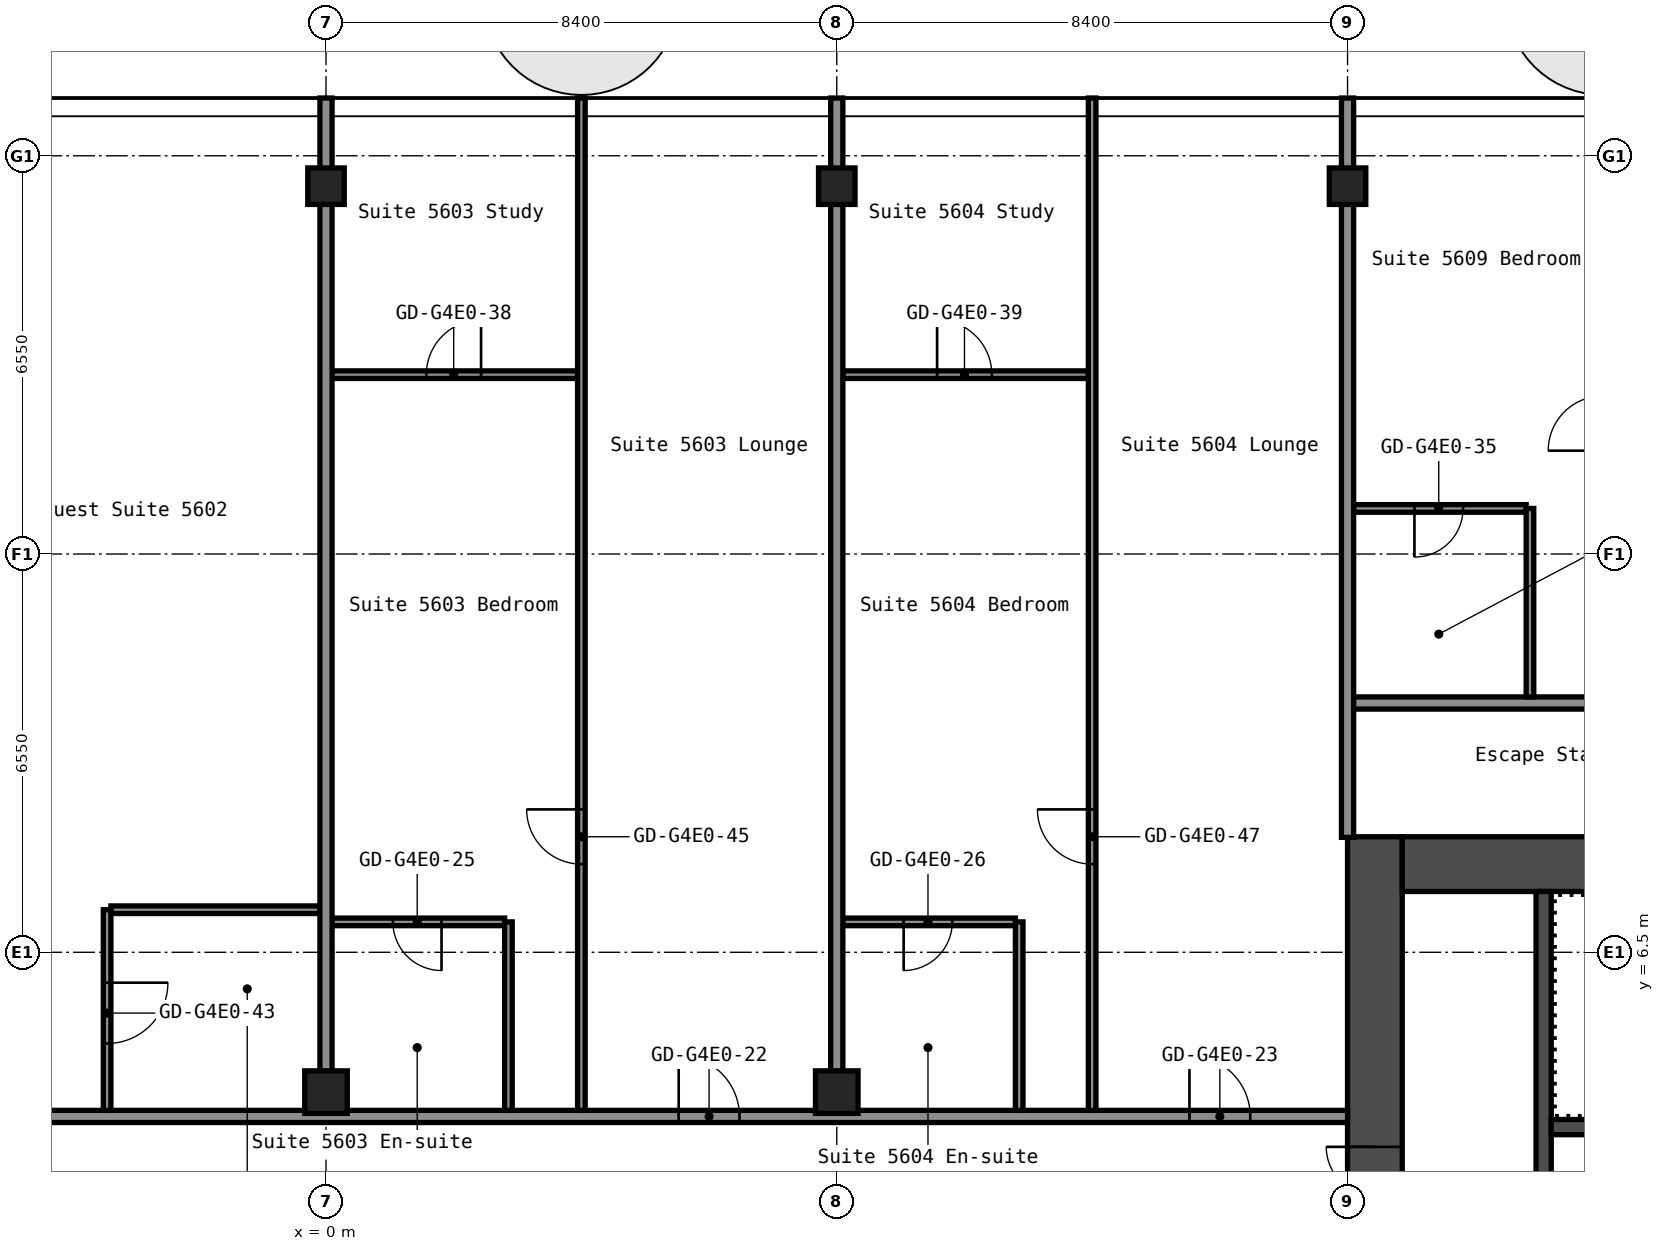
"""IFC4 building model, lengths in metres.
Left out: names, types, materials, properties, quantities, classifications, styles, units other than length and angle.
Written with IfcOpenShell. Run it as: python <this file> out.ifc"""

import sys

from ifc_helpers import new_model, si_unit, direction, frame, frame_2d, origin, origin_2d, place, context, subcontext, project, spatial, rectangle, hollow_rectangle, extrude, element, fill, save


model = new_model("IFC4")
c1 = context("Model", 3, precision=1e-05, world=origin(), true_north=direction((0.0, 1.0)))
c2 = subcontext(c1, "Body", "Model", "MODEL_VIEW")
j1 = project(units=[si_unit("LENGTHUNIT", "METRE"), si_unit("PLANEANGLEUNIT", "RADIAN")], contexts=[c1])
p1 = place(None, origin())
s1 = spatial("IfcSite", under=j1, at=p1, CompositionType="ELEMENT")
p2 = place(p1, origin())
s2 = spatial("IfcBuilding", under=s1, at=p2, CompositionType="ELEMENT")
p3 = place(p2, frame((0.0, 0.0, 199.4)))
s3 = spatial("IfcBuildingStorey", under=s2, at=p3, CompositionType="ELEMENT", Elevation=199.4)
p4 = place(p3, frame((0.0, 4.2, 0.0), z_axis=(0.0, 0.0, 1.0), x_axis=(1.0, 0.0, 0.0)))
e1 = element("IfcColumn", 1, at=p4, inside=s3, PredefinedType="COLUMN", context=c2, shape_type="SweptSolid", body=[
    extrude(hollow_rectangle(XDim=0.7, YDim=0.7, WallThickness=0.028, at=origin_2d()), origin(), (0.0, 0.0, 1.0), 2.75),
])
p5 = place(p3, frame((0.0, 19.1, 0.0), z_axis=(0.0, 0.0, 1.0), x_axis=(1.0, 0.0, 0.0)))
e2 = element("IfcColumn", 2, at=p5, inside=s3, PredefinedType="COLUMN", context=c2, shape_type="SweptSolid", body=[
    extrude(hollow_rectangle(XDim=0.6, YDim=0.6, WallThickness=0.025, InnerFilletRadius=0.038, OuterFilletRadius=0.062, at=origin_2d()), origin(), (0.0, 0.0, 1.0), 2.75),
])
p6 = place(p3, frame((8.4, 4.2, 0.0), z_axis=(0.0, 0.0, 1.0), x_axis=(1.0, 0.0, 0.0)))
e3 = element("IfcColumn", 3, at=p6, inside=s3, PredefinedType="COLUMN", context=c2, shape_type="SweptSolid", body=[
    extrude(hollow_rectangle(XDim=0.7, YDim=0.7, WallThickness=0.028, at=origin_2d()), origin(), (0.0, 0.0, 1.0), 2.75),
])
for number, where, z_axis, x_axis in (
    (4, (8.4, 19.1, 0.0), (0.0, 0.0, 1.0), (1.0, 0.0, 0.0)),
    (5, (16.8, 19.1, 0.0), (0.0, 0.0, 1.0), (1.0, 0.0, 0.0)),
):
    element("IfcColumn", number, at=place(p3, frame(where, z_axis=z_axis, x_axis=x_axis)), inside=s3, PredefinedType="COLUMN", context=c2, shape_type="SweptSolid", body=[
        extrude(hollow_rectangle(XDim=0.6, YDim=0.6, WallThickness=0.025, InnerFilletRadius=0.038, OuterFilletRadius=0.062, at=origin_2d()), origin(), (0.0, 0.0, 1.0), 2.75),
    ])
p7 = place(p3, frame((17.25, -8.4, 0.0), z_axis=(0.0, 0.0, 1.0), x_axis=(0.0, 1.0, 0.0)))
e6 = element("IfcWall", 6, at=p7, inside=s3, PredefinedType="SHEAR", context=c2, shape_type="SweptSolid", body=[
    extrude(rectangle(XDim=16.8, YDim=0.9, at=frame_2d((8.4, 0.0))), origin(), (0.0, 0.0, 1.0), 2.75),
])
p8 = place(p7, frame((10.1, 0.0, 0.0)))
e7 = element("IfcOpeningElement", 7, at=p8, cuts=e6, PredefinedType="OPENING", context=c2, shape_type="SweptSolid", body=[
    extrude(rectangle(XDim=1.6, YDim=2.1, at=frame_2d((0.8, 1.05))), frame((0.0, 0.46, 0.0), z_axis=(0.0, -1.0, 0.0), x_axis=(1.0, 0.0, 0.0)), (0.0, 0.0, 1.0), 0.92),
])
p9 = place(p3, frame((17.7, 7.95, 0.0), z_axis=(0.0, 0.0, 1.0), x_axis=(1.0, 0.0, 0.0)))
e8 = element("IfcWall", 8, at=p9, inside=s3, PredefinedType="SHEAR", context=c2, shape_type="SweptSolid", body=[
    extrude(rectangle(XDim=15.0, YDim=0.9, at=frame_2d((7.5, 0.0))), origin(), (0.0, 0.0, 1.0), 2.75),
])
p10 = place(p9, frame((10.4, 0.0, 0.0)))
e9 = element("IfcOpeningElement", 9, at=p10, cuts=e8, PredefinedType="OPENING", context=c2, shape_type="SweptSolid", body=[
    extrude(rectangle(XDim=1.2, YDim=2.1, at=frame_2d((0.6, 1.05))), frame((0.0, 0.46, 0.0), z_axis=(0.0, -1.0, 0.0), x_axis=(1.0, 0.0, 0.0)), (0.0, 0.0, 1.0), 0.92),
])
p11 = place(p9, frame((13.35, 0.0, 0.0)))
e10 = element("IfcOpeningElement", 10, at=p11, cuts=e8, PredefinedType="OPENING", context=c2, shape_type="SweptSolid", body=[
    extrude(rectangle(XDim=0.9, YDim=2.1, at=frame_2d((0.45, 1.05))), frame((0.0, 0.46, 0.0), z_axis=(0.0, -1.0, 0.0), x_axis=(1.0, 0.0, 0.0)), (0.0, 0.0, 1.0), 0.92),
])
p12 = place(p3, frame((20.025, 1.2, 0.0), z_axis=(0.0, 0.0, 1.0), x_axis=(0.0, 1.0, 0.0)))
e11 = element("IfcWall", 11, at=p12, inside=s3, PredefinedType="SHEAR", context=c2, shape_type="SweptSolid", body=[
    extrude(rectangle(XDim=6.3, YDim=0.25, at=frame_2d((3.15, 0.0))), origin(), (0.0, 0.0, 1.0), 2.75),
])
p13 = place(p3, frame((20.15, 3.625, 0.0), z_axis=(0.0, 0.0, 1.0), x_axis=(1.0, 0.0, 0.0)))
e12 = element("IfcWall", 12, at=p13, inside=s3, PredefinedType="SHEAR", context=c2, shape_type="SweptSolid", body=[
    extrude(rectangle(XDim=7.5, YDim=0.25, at=frame_2d((3.75, 0.0))), origin(), (0.0, 0.0, 1.0), 2.75),
])
p14 = place(p3, frame((-16.8, 3.8, 0.0), z_axis=(0.0, 0.0, 1.0), x_axis=(1.0, 0.0, 0.0)))
e13 = element("IfcWall", 13, at=p14, inside=s3, PredefinedType="PARTITIONING", context=c2, shape_type="SweptSolid", body=[
    extrude(rectangle(XDim=33.6, YDim=0.2, at=frame_2d((16.8, 0.0))), origin(), (0.0, 0.0, 1.0), 2.75),
])
p15 = place(p14, frame((5.8, 0.0, 0.0)))
e14 = element("IfcOpeningElement", 14, at=p15, cuts=e13, PredefinedType="OPENING", context=c2, shape_type="SweptSolid", body=[
    extrude(rectangle(XDim=1.0, YDim=2.1, at=frame_2d((0.5, 1.05))), frame((0.0, 0.11, 0.0), z_axis=(0.0, -1.0, 0.0), x_axis=(1.0, 0.0, 0.0)), (0.0, 0.0, 1.0), 0.22),
])
p16 = place(p14, frame((10.3, 0.0, 0.0)))
e15 = element("IfcOpeningElement", 15, at=p16, cuts=e13, PredefinedType="OPENING", context=c2, shape_type="SweptSolid", body=[
    extrude(rectangle(XDim=1.0, YDim=2.1, at=frame_2d((0.5, 1.05))), frame((0.0, 0.11, 0.0), z_axis=(0.0, -1.0, 0.0), x_axis=(1.0, 0.0, 0.0)), (0.0, 0.0, 1.0), 0.22),
])
p17 = place(p14, frame((22.6, 0.0, 0.0)))
e16 = element("IfcOpeningElement", 16, at=p17, cuts=e13, PredefinedType="OPENING", context=c2, shape_type="SweptSolid", body=[
    extrude(rectangle(XDim=1.0, YDim=2.1, at=frame_2d((0.5, 1.05))), frame((0.0, 0.11, 0.0), z_axis=(0.0, -1.0, 0.0), x_axis=(1.0, 0.0, 0.0)), (0.0, 0.0, 1.0), 0.22),
])
p18 = place(p14, frame((31.0, 0.0, 0.0)))
e17 = element("IfcOpeningElement", 17, at=p18, cuts=e13, PredefinedType="OPENING", context=c2, shape_type="SweptSolid", body=[
    extrude(rectangle(XDim=1.0, YDim=2.1, at=frame_2d((0.5, 1.05))), frame((0.0, 0.11, 0.0), z_axis=(0.0, -1.0, 0.0), x_axis=(1.0, 0.0, 0.0)), (0.0, 0.0, 1.0), 0.22),
])
p19 = place(p3, frame((0.1, 7.0, 0.0), z_axis=(0.0, 0.0, 1.0), x_axis=(1.0, 0.0, 0.0)))
e18 = element("IfcWall", 18, at=p19, inside=s3, PredefinedType="PARTITIONING", context=c2, shape_type="SweptSolid", body=[
    extrude(rectangle(XDim=2.837, YDim=0.125, at=frame_2d((1.419, 0.0))), origin(), (0.0, 0.0, 1.0), 2.75),
])
p20 = place(p19, frame((1.0, 0.0, 0.0)))
e19 = element("IfcOpeningElement", 19, at=p20, cuts=e18, PredefinedType="OPENING", context=c2, shape_type="SweptSolid", body=[
    extrude(rectangle(XDim=0.8, YDim=2.1, at=frame_2d((0.4, 1.05))), frame((0.0, 0.073, 0.0), z_axis=(0.0, -1.0, 0.0), x_axis=(1.0, 0.0, 0.0)), (0.0, 0.0, 1.0), 0.145),
])
p21 = place(p3, frame((8.5, 7.0, 0.0), z_axis=(0.0, 0.0, 1.0), x_axis=(1.0, 0.0, 0.0)))
e20 = element("IfcWall", 20, at=p21, inside=s3, PredefinedType="PARTITIONING", context=c2, shape_type="SweptSolid", body=[
    extrude(rectangle(XDim=2.837, YDim=0.125, at=frame_2d((1.419, 0.0))), origin(), (0.0, 0.0, 1.0), 2.75),
])
p22 = place(p21, frame((1.0, 0.0, 0.0)))
e21 = element("IfcOpeningElement", 21, at=p22, cuts=e20, PredefinedType="OPENING", context=c2, shape_type="SweptSolid", body=[
    extrude(rectangle(XDim=0.8, YDim=2.1, at=frame_2d((0.4, 1.05))), frame((0.0, 0.073, 0.0), z_axis=(0.0, -1.0, 0.0), x_axis=(1.0, 0.0, 0.0)), (0.0, 0.0, 1.0), 0.145),
])
p23 = place(p3, frame((-3.538, 7.2, 0.0), z_axis=(0.0, 0.0, 1.0), x_axis=(1.0, 0.0, 0.0)))
e22 = element("IfcWall", 22, at=p23, inside=s3, PredefinedType="PARTITIONING", context=c2, shape_type="SweptSolid", body=[
    extrude(rectangle(XDim=3.438, YDim=0.125, at=frame_2d((1.719, 0.0))), origin(), (0.0, 0.0, 1.0), 2.75),
])
p24 = place(p3, frame((16.8, 10.6, 0.0), z_axis=(0.0, 0.0, 1.0), x_axis=(1.0, 0.0, 0.0)))
e23 = element("IfcWall", 23, at=p24, inside=s3, PredefinedType="PARTITIONING", context=c2, shape_type="SweptSolid", body=[
    extrude(rectangle(XDim=21.3, YDim=0.2, at=frame_2d((10.65, 0.0))), origin(), (0.0, 0.0, 1.0), 2.75),
])
p25 = place(p24, frame((5.8, 0.0, 0.0)))
e24 = element("IfcOpeningElement", 24, at=p25, cuts=e23, PredefinedType="OPENING", context=c2, shape_type="SweptSolid", body=[
    extrude(rectangle(XDim=1.0, YDim=2.1, at=frame_2d((0.5, 1.05))), frame((0.0, 0.11, 0.0), z_axis=(0.0, -1.0, 0.0), x_axis=(1.0, 0.0, 0.0)), (0.0, 0.0, 1.0), 0.22),
])
p26 = place(p24, frame((14.2, 0.0, 0.0)))
e25 = element("IfcOpeningElement", 25, at=p26, cuts=e23, PredefinedType="OPENING", context=c2, shape_type="SweptSolid", body=[
    extrude(rectangle(XDim=1.0, YDim=2.1, at=frame_2d((0.5, 1.05))), frame((0.0, 0.11, 0.0), z_axis=(0.0, -1.0, 0.0), x_axis=(1.0, 0.0, 0.0)), (0.0, 0.0, 1.0), 0.22),
])
p27 = place(p24, frame((18.45, 0.0, 0.0)))
e26 = element("IfcOpeningElement", 26, at=p27, cuts=e23, PredefinedType="OPENING", context=c2, shape_type="SweptSolid", body=[
    extrude(rectangle(XDim=0.9, YDim=2.1, at=frame_2d((0.45, 1.05))), frame((0.0, 0.11, 0.0), z_axis=(0.0, -1.0, 0.0), x_axis=(1.0, 0.0, 0.0)), (0.0, 0.0, 1.0), 0.22),
])
p28 = place(p3, frame((16.9, 13.8, 0.0), z_axis=(0.0, 0.0, 1.0), x_axis=(1.0, 0.0, 0.0)))
e27 = element("IfcWall", 27, at=p28, inside=s3, PredefinedType="PARTITIONING", context=c2, shape_type="SweptSolid", body=[
    extrude(rectangle(XDim=2.838, YDim=0.125, at=frame_2d((1.419, 0.0))), origin(), (0.0, 0.0, 1.0), 2.75),
])
p29 = place(p28, frame((1.0, 0.0, 0.0)))
e28 = element("IfcOpeningElement", 28, at=p29, cuts=e27, PredefinedType="OPENING", context=c2, shape_type="SweptSolid", body=[
    extrude(rectangle(XDim=0.8, YDim=2.1, at=frame_2d((0.4, 1.05))), frame((0.0, 0.073, 0.0), z_axis=(0.0, -1.0, 0.0), x_axis=(1.0, 0.0, 0.0)), (0.0, 0.0, 1.0), 0.145),
])
p30 = place(p3, frame((0.1, 16.0, 0.0), z_axis=(0.0, 0.0, 1.0), x_axis=(1.0, 0.0, 0.0)))
e29 = element("IfcWall", 29, at=p30, inside=s3, PredefinedType="PARTITIONING", context=c2, shape_type="SweptSolid", body=[
    extrude(rectangle(XDim=4.037, YDim=0.125, at=frame_2d((2.019, 0.0))), origin(), (0.0, 0.0, 1.0), 2.75),
])
p31 = place(p30, frame((1.55, 0.0, 0.0)))
e30 = element("IfcOpeningElement", 30, at=p31, cuts=e29, PredefinedType="OPENING", context=c2, shape_type="SweptSolid", body=[
    extrude(rectangle(XDim=0.9, YDim=2.1, at=frame_2d((0.45, 1.05))), frame((0.0, 0.073, 0.0), z_axis=(0.0, -1.0, 0.0), x_axis=(1.0, 0.0, 0.0)), (0.0, 0.0, 1.0), 0.145),
])
p32 = place(p3, frame((8.5, 16.0, 0.0), z_axis=(0.0, 0.0, 1.0), x_axis=(1.0, 0.0, 0.0)))
e31 = element("IfcWall", 31, at=p32, inside=s3, PredefinedType="PARTITIONING", context=c2, shape_type="SweptSolid", body=[
    extrude(rectangle(XDim=4.038, YDim=0.125, at=frame_2d((2.019, 0.0))), origin(), (0.0, 0.0, 1.0), 2.75),
])
p33 = place(p32, frame((1.55, 0.0, 0.0)))
e32 = element("IfcOpeningElement", 32, at=p33, cuts=e31, PredefinedType="OPENING", context=c2, shape_type="SweptSolid", body=[
    extrude(rectangle(XDim=0.9, YDim=2.1, at=frame_2d((0.45, 1.05))), frame((0.0, 0.073, 0.0), z_axis=(0.0, -1.0, 0.0), x_axis=(1.0, 0.0, 0.0)), (0.0, 0.0, 1.0), 0.145),
])
p34 = place(p3, frame((-3.6, 3.9, 0.0), z_axis=(0.0, 0.0, 1.0), x_axis=(0.0, 1.0, 0.0)))
e33 = element("IfcWall", 33, at=p34, inside=s3, PredefinedType="PARTITIONING", context=c2, shape_type="SweptSolid", body=[
    extrude(rectangle(XDim=3.3, YDim=0.125, at=frame_2d((1.65, 0.0))), origin(), (0.0, 0.0, 1.0), 2.75),
])
p35 = place(p34, frame((1.1, 0.0, 0.0)))
e34 = element("IfcOpeningElement", 34, at=p35, cuts=e33, PredefinedType="OPENING", context=c2, shape_type="SweptSolid", body=[
    extrude(rectangle(XDim=1.0, YDim=2.1, at=frame_2d((0.5, 1.05))), frame((0.0, 0.073, 0.0), z_axis=(0.0, -1.0, 0.0), x_axis=(1.0, 0.0, 0.0)), (0.0, 0.0, 1.0), 0.145),
])
p36 = place(p3, frame((0.0, 4.54, 0.0), z_axis=(0.0, 0.0, 1.0), x_axis=(0.0, 1.0, 0.0)))
e35 = element("IfcWall", 35, at=p36, inside=s3, PredefinedType="PARTITIONING", context=c2, shape_type="SweptSolid", body=[
    extrude(rectangle(XDim=16.01, YDim=0.2, at=frame_2d((8.005, 0.0))), origin(), (0.0, 0.0, 1.0), 2.75),
])
p37 = place(p3, frame((3.0, 3.9, 0.0), z_axis=(0.0, 0.0, 1.0), x_axis=(0.0, 1.0, 0.0)))
e36 = element("IfcWall", 36, at=p37, inside=s3, PredefinedType="PARTITIONING", context=c2, shape_type="SweptSolid", body=[
    extrude(rectangle(XDim=3.1, YDim=0.125, at=frame_2d((1.55, 0.0))), origin(), (0.0, 0.0, 1.0), 2.75),
])
p38 = place(p3, frame((4.2, 3.9, 0.0), z_axis=(0.0, 0.0, 1.0), x_axis=(0.0, 1.0, 0.0)))
e37 = element("IfcWall", 37, at=p38, inside=s3, PredefinedType="PARTITIONING", context=c2, shape_type="SweptSolid", body=[
    extrude(rectangle(XDim=16.65, YDim=0.125, at=frame_2d((8.325, 0.0))), origin(), (0.0, 0.0, 1.0), 2.75),
])
p39 = place(p38, frame((4.05, 0.0, 0.0)))
e38 = element("IfcOpeningElement", 38, at=p39, cuts=e37, PredefinedType="OPENING", context=c2, shape_type="SweptSolid", body=[
    extrude(rectangle(XDim=0.9, YDim=2.1, at=frame_2d((0.45, 1.05))), frame((0.0, 0.073, 0.0), z_axis=(0.0, -1.0, 0.0), x_axis=(1.0, 0.0, 0.0)), (0.0, 0.0, 1.0), 0.145),
])
p40 = place(p3, frame((8.4, 4.54, 0.0), z_axis=(0.0, 0.0, 1.0), x_axis=(0.0, 1.0, 0.0)))
e39 = element("IfcWall", 39, at=p40, inside=s3, PredefinedType="PARTITIONING", context=c2, shape_type="SweptSolid", body=[
    extrude(rectangle(XDim=16.01, YDim=0.2, at=frame_2d((8.005, 0.0))), origin(), (0.0, 0.0, 1.0), 2.75),
])
p41 = place(p3, frame((11.4, 3.9, 0.0), z_axis=(0.0, 0.0, 1.0), x_axis=(0.0, 1.0, 0.0)))
e40 = element("IfcWall", 40, at=p41, inside=s3, PredefinedType="PARTITIONING", context=c2, shape_type="SweptSolid", body=[
    extrude(rectangle(XDim=3.1, YDim=0.125, at=frame_2d((1.55, 0.0))), origin(), (0.0, 0.0, 1.0), 2.75),
])
p42 = place(p3, frame((12.6, 3.9, 0.0), z_axis=(0.0, 0.0, 1.0), x_axis=(0.0, 1.0, 0.0)))
e41 = element("IfcWall", 41, at=p42, inside=s3, PredefinedType="PARTITIONING", context=c2, shape_type="SweptSolid", body=[
    extrude(rectangle(XDim=16.65, YDim=0.125, at=frame_2d((8.325, 0.0))), origin(), (0.0, 0.0, 1.0), 2.75),
])
p43 = place(p42, frame((4.05, 0.0, 0.0)))
e42 = element("IfcOpeningElement", 42, at=p43, cuts=e41, PredefinedType="OPENING", context=c2, shape_type="SweptSolid", body=[
    extrude(rectangle(XDim=0.9, YDim=2.1, at=frame_2d((0.45, 1.05))), frame((0.0, 0.073, 0.0), z_axis=(0.0, -1.0, 0.0), x_axis=(1.0, 0.0, 0.0)), (0.0, 0.0, 1.0), 0.145),
])
p44 = place(p3, frame((16.8, 8.39, 0.0), z_axis=(0.0, 0.0, 1.0), x_axis=(0.0, 1.0, 0.0)))
e43 = element("IfcWall", 43, at=p44, inside=s3, PredefinedType="PARTITIONING", context=c2, shape_type="SweptSolid", body=[
    extrude(rectangle(XDim=12.16, YDim=0.2, at=frame_2d((6.08, 0.0))), origin(), (0.0, 0.0, 1.0), 2.75),
])
p45 = place(p3, frame((19.8, 10.7, 0.0), z_axis=(0.0, 0.0, 1.0), x_axis=(0.0, 1.0, 0.0)))
e44 = element("IfcWall", 44, at=p45, inside=s3, PredefinedType="PARTITIONING", context=c2, shape_type="SweptSolid", body=[
    extrude(rectangle(XDim=3.1, YDim=0.125, at=frame_2d((1.55, 0.0))), origin(), (0.0, 0.0, 1.0), 2.75),
])
p46 = place(p8, origin())
e45 = element("IfcDoor", 45, at=p46, inside=s3, OperationType="DOUBLE_DOOR_SINGLE_SWING", PredefinedType="DOOR", context=c2, shape_type="SweptSolid", body=[
    extrude(rectangle(XDim=1.6, YDim=2.1, at=frame_2d((0.8, 1.05))), frame((0.0, 0.025, 0.0), z_axis=(0.0, -1.0, 0.0), x_axis=(1.0, 0.0, 0.0)), (0.0, 0.0, 1.0), 0.05),
])
fill(e7, e45)
p47 = place(p17, origin())
e46 = element("IfcDoor", 46, at=p47, inside=s3, OperationType="SINGLE_SWING_RIGHT", PredefinedType="DOOR", context=c2, shape_type="SweptSolid", body=[
    extrude(rectangle(XDim=1.0, YDim=2.1, at=frame_2d((0.5, 1.05))), frame((0.0, 0.025, 0.0), z_axis=(0.0, -1.0, 0.0), x_axis=(1.0, 0.0, 0.0)), (0.0, 0.0, 1.0), 0.05),
])
fill(e16, e46)
p48 = place(p18, origin())
e47 = element("IfcDoor", 47, at=p48, inside=s3, OperationType="SINGLE_SWING_RIGHT", PredefinedType="DOOR", context=c2, shape_type="SweptSolid", body=[
    extrude(rectangle(XDim=1.0, YDim=2.1, at=frame_2d((0.5, 1.05))), frame((0.0, 0.025, 0.0), z_axis=(0.0, -1.0, 0.0), x_axis=(1.0, 0.0, 0.0)), (0.0, 0.0, 1.0), 0.05),
])
fill(e17, e47)
p49 = place(p20, origin())
e48 = element("IfcDoor", 48, at=p49, inside=s3, OperationType="SINGLE_SWING_RIGHT", PredefinedType="DOOR", context=c2, shape_type="SweptSolid", body=[
    extrude(rectangle(XDim=0.8, YDim=2.1, at=frame_2d((0.4, 1.05))), frame((0.0, 0.025, 0.0), z_axis=(0.0, -1.0, 0.0), x_axis=(1.0, 0.0, 0.0)), (0.0, 0.0, 1.0), 0.05),
])
fill(e19, e48)
p50 = place(p22, origin())
e49 = element("IfcDoor", 49, at=p50, inside=s3, OperationType="SINGLE_SWING_LEFT", PredefinedType="DOOR", context=c2, shape_type="SweptSolid", body=[
    extrude(rectangle(XDim=0.8, YDim=2.1, at=frame_2d((0.4, 1.05))), frame((0.0, 0.025, 0.0), z_axis=(0.0, -1.0, 0.0), x_axis=(1.0, 0.0, 0.0)), (0.0, 0.0, 1.0), 0.05),
])
fill(e21, e49)
p51 = place(p29, origin())
e50 = element("IfcDoor", 50, at=p51, inside=s3, OperationType="SINGLE_SWING_LEFT", PredefinedType="DOOR", context=c2, shape_type="SweptSolid", body=[
    extrude(rectangle(XDim=0.8, YDim=2.1, at=frame_2d((0.4, 1.05))), frame((0.0, 0.025, 0.0), z_axis=(0.0, -1.0, 0.0), x_axis=(1.0, 0.0, 0.0)), (0.0, 0.0, 1.0), 0.05),
])
fill(e28, e50)
p52 = place(p31, origin())
e51 = element("IfcDoor", 51, at=p52, inside=s3, OperationType="SINGLE_SWING_LEFT", PredefinedType="DOOR", context=c2, shape_type="SweptSolid", body=[
    extrude(rectangle(XDim=0.9, YDim=2.1, at=frame_2d((0.45, 1.05))), frame((0.0, 0.025, 0.0), z_axis=(0.0, -1.0, 0.0), x_axis=(1.0, 0.0, 0.0)), (0.0, 0.0, 1.0), 0.05),
])
fill(e30, e51)
p53 = place(p33, origin())
e52 = element("IfcDoor", 52, at=p53, inside=s3, OperationType="SINGLE_SWING_RIGHT", PredefinedType="DOOR", context=c2, shape_type="SweptSolid", body=[
    extrude(rectangle(XDim=0.9, YDim=2.1, at=frame_2d((0.45, 1.05))), frame((0.0, 0.025, 0.0), z_axis=(0.0, -1.0, 0.0), x_axis=(1.0, 0.0, 0.0)), (0.0, 0.0, 1.0), 0.05),
])
fill(e32, e52)
p54 = place(p35, origin())
e53 = element("IfcDoor", 53, at=p54, inside=s3, OperationType="SINGLE_SWING_RIGHT", PredefinedType="DOOR", context=c2, shape_type="SweptSolid", body=[
    extrude(rectangle(XDim=1.0, YDim=2.1, at=frame_2d((0.5, 1.05))), frame((0.0, 0.025, 0.0), z_axis=(0.0, -1.0, 0.0), x_axis=(1.0, 0.0, 0.0)), (0.0, 0.0, 1.0), 0.05),
])
fill(e34, e53)
p55 = place(p39, origin())
e54 = element("IfcDoor", 54, at=p55, inside=s3, OperationType="SINGLE_SWING_LEFT", PredefinedType="DOOR", context=c2, shape_type="SweptSolid", body=[
    extrude(rectangle(XDim=0.9, YDim=2.1, at=frame_2d((0.45, 1.05))), frame((0.0, 0.025, 0.0), z_axis=(0.0, -1.0, 0.0), x_axis=(1.0, 0.0, 0.0)), (0.0, 0.0, 1.0), 0.05),
])
fill(e38, e54)
p56 = place(p43, origin())
e55 = element("IfcDoor", 55, at=p56, inside=s3, OperationType="SINGLE_SWING_LEFT", PredefinedType="DOOR", context=c2, shape_type="SweptSolid", body=[
    extrude(rectangle(XDim=0.9, YDim=2.1, at=frame_2d((0.45, 1.05))), frame((0.0, 0.025, 0.0), z_axis=(0.0, -1.0, 0.0), x_axis=(1.0, 0.0, 0.0)), (0.0, 0.0, 1.0), 0.05),
])
fill(e42, e55)
save(model, sys.argv[1])
